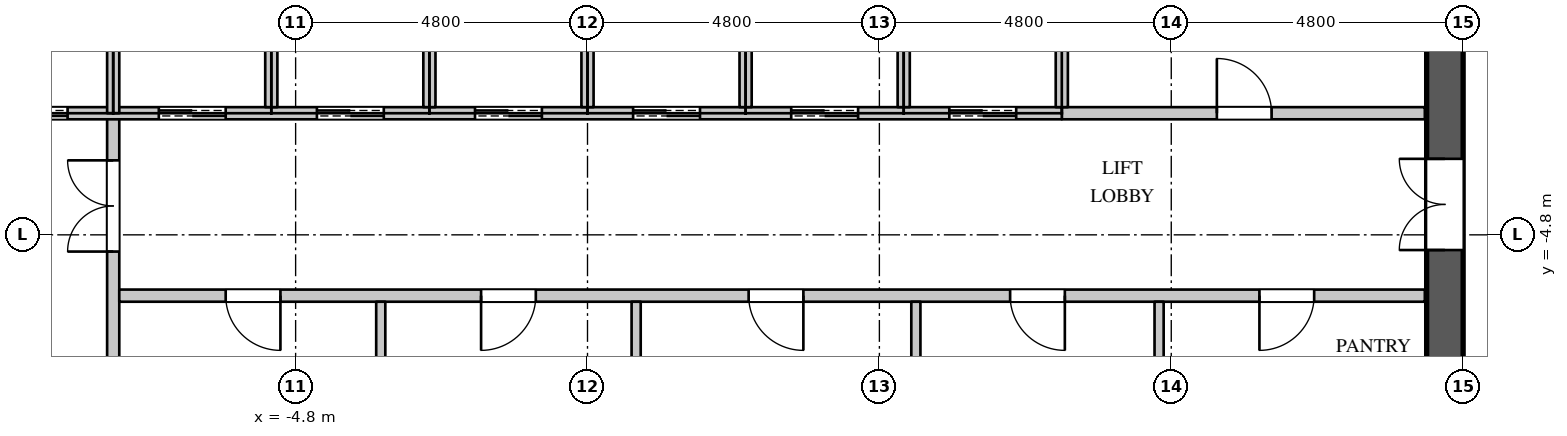
"""IFC4 building model, lengths in metres.
Left out: names, types, materials, properties, quantities, classifications, styles, units other than length and angle.
Written with IfcOpenShell. Run it as: python <this file> out.ifc"""

import sys

from ifc_helpers import new_model, si_unit, direction, frame, frame_2d, origin, place, context, subcontext, project, spatial, rectangle, extrude, element, fill, save


model = new_model("IFC4")
c1 = context("Model", 3, precision=1e-05, world=origin(), true_north=direction((0.0, 1.0)))
c2 = subcontext(c1, "Body", "Model", "MODEL_VIEW")
j1 = project(units=[si_unit("LENGTHUNIT", "METRE"), si_unit("PLANEANGLEUNIT", "RADIAN")], contexts=[c1])
p1 = place(None, origin())
s1 = spatial("IfcSite", under=j1, at=p1, CompositionType="ELEMENT")
p2 = place(p1, origin())
s2 = spatial("IfcBuilding", under=s1, at=p2, CompositionType="ELEMENT")
p3 = place(p2, frame((0.0, 0.0, 218.1)))
s3 = spatial("IfcBuildingStorey", under=s2, at=p3, CompositionType="ELEMENT", Elevation=218.1)
p4 = place(p3, frame((14.1, -11.4, 0.0), z_axis=(0.0, 0.0, 1.0), x_axis=(0.0, 1.0, 0.0)))
e1 = element("IfcWall", 1, at=p4, inside=s3, PredefinedType="SHEAR", context=c2, shape_type="SweptSolid", body=[
    extrude(rectangle(XDim=22.8, YDim=0.6, at=frame_2d((11.4, 0.0))), origin(), (0.0, 0.0, 1.0), 4.2),
])
p5 = place(p4, frame((20.45, 0.0, 0.0)))
e2 = element("IfcOpeningElement", 2, at=p5, cuts=e1, PredefinedType="OPENING", context=c2, shape_type="SweptSolid", body=[
    extrude(rectangle(XDim=1.1, YDim=2.2, at=frame_2d((0.55, 1.1))), frame((0.0, 0.31, 0.0), z_axis=(0.0, -1.0, 0.0), x_axis=(1.0, 0.0, 0.0)), (0.0, 0.0, 1.0), 0.62),
])
p6 = place(p4, frame((1.25, 0.0, 0.0)))
e3 = element("IfcOpeningElement", 3, at=p6, cuts=e1, PredefinedType="OPENING", context=c2, shape_type="SweptSolid", body=[
    extrude(rectangle(XDim=1.1, YDim=2.2, at=frame_2d((0.55, 1.1))), frame((0.0, 0.31, 0.0), z_axis=(0.0, -1.0, 0.0), x_axis=(1.0, 0.0, 0.0)), (0.0, 0.0, 1.0), 0.62),
])
p7 = place(p4, frame((14.95, 0.0, 0.0)))
e4 = element("IfcOpeningElement", 4, at=p7, cuts=e1, PredefinedType="OPENING", context=c2, shape_type="SweptSolid", body=[
    extrude(rectangle(XDim=1.5, YDim=2.4, at=frame_2d((0.75, 1.2))), frame((0.0, 0.31, 0.0), z_axis=(0.0, -1.0, 0.0), x_axis=(1.0, 0.0, 0.0)), (0.0, 0.0, 1.0), 0.62),
])
p8 = place(p4, frame((6.35, 0.0, 0.0)))
e5 = element("IfcOpeningElement", 5, at=p8, cuts=e1, PredefinedType="OPENING", context=c2, shape_type="SweptSolid", body=[
    extrude(rectangle(XDim=1.5, YDim=2.4, at=frame_2d((0.75, 1.2))), frame((0.0, 0.31, 0.0), z_axis=(0.0, -1.0, 0.0), x_axis=(1.0, 0.0, 0.0)), (0.0, 0.0, 1.0), 0.62),
])
p9 = place(p3, frame((-7.8, -8.075, 0.0), z_axis=(0.0, 0.0, 1.0), x_axis=(0.0, 1.0, 0.0)))
e6 = element("IfcWall", 6, at=p9, inside=s3, PredefinedType="PARTITIONING", context=c2, shape_type="SweptSolid", body=[
    extrude(rectangle(XDim=5.275, YDim=0.2, at=frame_2d((2.637, 0.0))), origin(), (0.0, 0.0, 1.0), 3.95),
])
p10 = place(p9, frame((3.0, 0.0, 0.0)))
e7 = element("IfcOpeningElement", 7, at=p10, cuts=e6, PredefinedType="OPENING", context=c2, shape_type="SweptSolid", body=[
    extrude(rectangle(XDim=1.5, YDim=2.4, at=frame_2d((0.75, 1.2))), frame((0.0, 0.11, 0.0), z_axis=(0.0, -1.0, 0.0), x_axis=(1.0, 0.0, 0.0)), (0.0, 0.0, 1.0), 0.22),
])
p11 = place(p3, frame((-7.7, -5.8, 0.0), z_axis=(0.0, 0.0, 1.0), x_axis=(1.0, 0.0, 0.0)))
e8 = element("IfcWall", 8, at=p11, inside=s3, PredefinedType="PARTITIONING", context=c2, shape_type="SweptSolid", body=[
    extrude(rectangle(XDim=21.47, YDim=0.2, at=frame_2d((10.735, 0.0))), origin(), (0.0, 0.0, 1.0), 3.95),
])
p12 = place(p11, frame((1.75, 0.0, 0.0)))
e9 = element("IfcOpeningElement", 9, at=p12, cuts=e8, PredefinedType="OPENING", context=c2, shape_type="SweptSolid", body=[
    extrude(rectangle(XDim=0.9, YDim=2.2, at=frame_2d((0.45, 1.1))), frame((0.0, 0.11, 0.0), z_axis=(0.0, -1.0, 0.0), x_axis=(1.0, 0.0, 0.0)), (0.0, 0.0, 1.0), 0.22),
])
p13 = place(p11, frame((5.95, 0.0, 0.0)))
e10 = element("IfcOpeningElement", 10, at=p13, cuts=e8, PredefinedType="OPENING", context=c2, shape_type="SweptSolid", body=[
    extrude(rectangle(XDim=0.9, YDim=2.2, at=frame_2d((0.45, 1.1))), frame((0.0, 0.11, 0.0), z_axis=(0.0, -1.0, 0.0), x_axis=(1.0, 0.0, 0.0)), (0.0, 0.0, 1.0), 0.22),
])
p14 = place(p11, frame((10.35, 0.0, 0.0)))
e11 = element("IfcOpeningElement", 11, at=p14, cuts=e8, PredefinedType="OPENING", context=c2, shape_type="SweptSolid", body=[
    extrude(rectangle(XDim=0.9, YDim=2.2, at=frame_2d((0.45, 1.1))), frame((0.0, 0.11, 0.0), z_axis=(0.0, -1.0, 0.0), x_axis=(1.0, 0.0, 0.0)), (0.0, 0.0, 1.0), 0.22),
])
p15 = place(p11, frame((14.65, 0.0, 0.0)))
e12 = element("IfcOpeningElement", 12, at=p15, cuts=e8, PredefinedType="OPENING", context=c2, shape_type="SweptSolid", body=[
    extrude(rectangle(XDim=0.9, YDim=2.2, at=frame_2d((0.45, 1.1))), frame((0.0, 0.11, 0.0), z_axis=(0.0, -1.0, 0.0), x_axis=(1.0, 0.0, 0.0)), (0.0, 0.0, 1.0), 0.22),
])
p16 = place(p11, frame((18.75, 0.0, 0.0)))
e13 = element("IfcOpeningElement", 13, at=p16, cuts=e8, PredefinedType="OPENING", context=c2, shape_type="SweptSolid", body=[
    extrude(rectangle(XDim=0.9, YDim=2.2, at=frame_2d((0.45, 1.1))), frame((0.0, 0.11, 0.0), z_axis=(0.0, -1.0, 0.0), x_axis=(1.0, 0.0, 0.0)), (0.0, 0.0, 1.0), 0.22),
])
for number, where, z_axis, x_axis in (
    (14, (-3.4, -11.37, 0.0), (0.0, 0.0, 1.0), (0.0, 1.0, 0.0)),
    (15, (0.8, -11.37, 0.0), (0.0, 0.0, 1.0), (0.0, 1.0, 0.0)),
):
    element("IfcWall", number, at=place(p3, frame(where, z_axis=z_axis, x_axis=x_axis)), inside=s3, PredefinedType="PARTITIONING", context=c2, shape_type="SweptSolid", body=[
        extrude(rectangle(XDim=5.47, YDim=0.15, at=frame_2d((2.735, 0.0))), origin(), (0.0, 0.0, 1.0), 3.95),
    ])
p17 = place(p3, frame((5.4, -8.2, 0.0), z_axis=(0.0, 0.0, 1.0), x_axis=(0.0, 1.0, 0.0)))
e16 = element("IfcWall", 16, at=p17, inside=s3, PredefinedType="PARTITIONING", context=c2, shape_type="SweptSolid", body=[
    extrude(rectangle(XDim=2.3, YDim=0.15, at=frame_2d((1.15, 0.0))), origin(), (0.0, 0.0, 1.0), 3.95),
])
p18 = place(p3, frame((9.4, -8.075, 0.0), z_axis=(0.0, 0.0, 1.0), x_axis=(0.0, 1.0, 0.0)))
e17 = element("IfcWall", 17, at=p18, inside=s3, PredefinedType="PARTITIONING", context=c2, shape_type="SweptSolid", body=[
    extrude(rectangle(XDim=2.175, YDim=0.15, at=frame_2d((1.087, 0.0))), origin(), (0.0, 0.0, 1.0), 3.95),
])
p19 = place(p3, frame((7.8, -2.8, 0.0), z_axis=(0.0, 0.0, 1.0), x_axis=(1.0, 0.0, 0.0)))
e18 = element("IfcWall", 18, at=p19, inside=s3, PredefinedType="PARTITIONING", context=c2, shape_type="SweptSolid", body=[
    extrude(rectangle(XDim=5.97, YDim=0.2, at=frame_2d((2.985, 0.0))), origin(), (0.0, 0.0, 1.0), 3.95),
])
p20 = place(p19, frame((2.55, 0.0, 0.0)))
e19 = element("IfcOpeningElement", 19, at=p20, cuts=e18, PredefinedType="OPENING", context=c2, shape_type="SweptSolid", body=[
    extrude(rectangle(XDim=0.9, YDim=2.2, at=frame_2d((0.45, 1.1))), frame((0.0, 0.11, 0.0), z_axis=(0.0, -1.0, 0.0), x_axis=(1.0, 0.0, 0.0)), (0.0, 0.0, 1.0), 0.22),
])
p21 = place(p3, frame((-10.4, -2.8, 0.0), z_axis=(0.0, 0.0, 1.0), x_axis=(1.0, 0.0, 0.0)))
e20 = element("IfcWall", 20, at=p21, inside=s3, PredefinedType="PARTITIONING", context=c2, shape_type="SweptSolid", body=[
    extrude(rectangle(XDim=18.2, YDim=0.2, at=frame_2d((9.1, 0.0))), origin(), (0.0, 0.0, 1.0), 3.95),
])
p22 = place(p21, frame((0.75, 0.0, 0.0)))
e21 = element("IfcOpeningElement", 21, at=p22, cuts=e20, PredefinedType="OPENING", context=c2, shape_type="SweptSolid", body=[
    extrude(rectangle(XDim=1.1, YDim=2.2, at=frame_2d((0.55, 1.1))), frame((0.0, 0.11, 0.0), z_axis=(0.0, -1.0, 0.0), x_axis=(1.0, 0.0, 0.0)), (0.0, 0.0, 1.0), 0.22),
])
p23 = place(p21, frame((3.35, 0.0, 0.0)))
e22 = element("IfcOpeningElement", 22, at=p23, cuts=e20, PredefinedType="OPENING", context=c2, shape_type="SweptSolid", body=[
    extrude(rectangle(XDim=1.1, YDim=2.2, at=frame_2d((0.55, 1.1))), frame((0.0, 0.11, 0.0), z_axis=(0.0, -1.0, 0.0), x_axis=(1.0, 0.0, 0.0)), (0.0, 0.0, 1.0), 0.22),
])
p24 = place(p21, frame((5.95, 0.0, 0.0)))
e23 = element("IfcOpeningElement", 23, at=p24, cuts=e20, PredefinedType="OPENING", context=c2, shape_type="SweptSolid", body=[
    extrude(rectangle(XDim=1.1, YDim=2.2, at=frame_2d((0.55, 1.1))), frame((0.0, 0.11, 0.0), z_axis=(0.0, -1.0, 0.0), x_axis=(1.0, 0.0, 0.0)), (0.0, 0.0, 1.0), 0.22),
])
p25 = place(p21, frame((8.55, 0.0, 0.0)))
e24 = element("IfcOpeningElement", 24, at=p25, cuts=e20, PredefinedType="OPENING", context=c2, shape_type="SweptSolid", body=[
    extrude(rectangle(XDim=1.1, YDim=2.2, at=frame_2d((0.55, 1.1))), frame((0.0, 0.11, 0.0), z_axis=(0.0, -1.0, 0.0), x_axis=(1.0, 0.0, 0.0)), (0.0, 0.0, 1.0), 0.22),
])
p26 = place(p21, frame((11.15, 0.0, 0.0)))
e25 = element("IfcOpeningElement", 25, at=p26, cuts=e20, PredefinedType="OPENING", context=c2, shape_type="SweptSolid", body=[
    extrude(rectangle(XDim=1.1, YDim=2.2, at=frame_2d((0.55, 1.1))), frame((0.0, 0.11, 0.0), z_axis=(0.0, -1.0, 0.0), x_axis=(1.0, 0.0, 0.0)), (0.0, 0.0, 1.0), 0.22),
])
p27 = place(p21, frame((13.75, 0.0, 0.0)))
e26 = element("IfcOpeningElement", 26, at=p27, cuts=e20, PredefinedType="OPENING", context=c2, shape_type="SweptSolid", body=[
    extrude(rectangle(XDim=1.1, YDim=2.2, at=frame_2d((0.55, 1.1))), frame((0.0, 0.11, 0.0), z_axis=(0.0, -1.0, 0.0), x_axis=(1.0, 0.0, 0.0)), (0.0, 0.0, 1.0), 0.22),
])
p28 = place(p21, frame((16.35, 0.0, 0.0)))
e27 = element("IfcOpeningElement", 27, at=p28, cuts=e20, PredefinedType="OPENING", context=c2, shape_type="SweptSolid", body=[
    extrude(rectangle(XDim=1.1, YDim=2.2, at=frame_2d((0.55, 1.1))), frame((0.0, 0.11, 0.0), z_axis=(0.0, -1.0, 0.0), x_axis=(1.0, 0.0, 0.0)), (0.0, 0.0, 1.0), 0.22),
])
p29 = place(p3, frame((-7.8, -2.8, 0.0), z_axis=(0.0, 0.0, 1.0), x_axis=(0.0, 1.0, 0.0)))
e28 = element("IfcWall", 28, at=p29, inside=s3, PredefinedType="PARTITIONING", context=c2, shape_type="SweptSolid", body=[
    extrude(rectangle(XDim=2.8, YDim=0.2, at=frame_2d((1.4, 0.0))), origin(), (0.0, 0.0, 1.0), 3.95),
])
for number, where, z_axis, x_axis in (
    (29, (-5.2, -2.7, 0.0), (0.0, 0.0, 1.0), (0.0, 1.0, 0.0)),
    (30, (-2.6, -2.7, 0.0), (0.0, 0.0, 1.0), (0.0, 1.0, 0.0)),
    (31, (0.0, -2.7, 0.0), (0.0, 0.0, 1.0), (0.0, 1.0, 0.0)),
    (32, (2.6, -2.7, 0.0), (0.0, 0.0, 1.0), (0.0, 1.0, 0.0)),
    (33, (5.2, -2.7, 0.0), (0.0, 0.0, 1.0), (0.0, 1.0, 0.0)),
    (34, (7.8, -2.7, 0.0), (0.0, 0.0, 1.0), (0.0, 1.0, 0.0)),
):
    element("IfcWall", number, at=place(p3, frame(where, z_axis=z_axis, x_axis=x_axis)), inside=s3, PredefinedType="PARTITIONING", context=c2, shape_type="SweptSolid", body=[
        extrude(rectangle(XDim=2.6, YDim=0.2, at=frame_2d((1.3, 0.0))), origin(), (0.0, 0.0, 1.0), 3.95),
    ])
p30 = place(p20, origin())
e35 = element("IfcDoor", 35, at=p30, inside=s3, OperationType="SINGLE_SWING_LEFT", PredefinedType="DOOR", context=c2, shape_type="SweptSolid", body=[
    extrude(rectangle(XDim=0.9, YDim=2.2, at=frame_2d((0.45, 1.1))), frame((0.0, 0.025, 0.0), z_axis=(0.0, -1.0, 0.0), x_axis=(1.0, 0.0, 0.0)), (0.0, 0.0, 1.0), 0.05),
])
fill(e19, e35)
p31 = place(p12, origin())
e36 = element("IfcDoor", 36, at=p31, inside=s3, OperationType="SINGLE_SWING_LEFT", PredefinedType="DOOR", context=c2, shape_type="SweptSolid", body=[
    extrude(rectangle(XDim=0.9, YDim=2.2, at=frame_2d((0.45, 1.1))), frame((0.0, 0.025, 0.0), z_axis=(0.0, -1.0, 0.0), x_axis=(1.0, 0.0, 0.0)), (0.0, 0.0, 1.0), 0.05),
])
fill(e9, e36)
p32 = place(p13, origin())
e37 = element("IfcDoor", 37, at=p32, inside=s3, OperationType="SINGLE_SWING_RIGHT", PredefinedType="DOOR", context=c2, shape_type="SweptSolid", body=[
    extrude(rectangle(XDim=0.9, YDim=2.2, at=frame_2d((0.45, 1.1))), frame((0.0, 0.025, 0.0), z_axis=(0.0, -1.0, 0.0), x_axis=(1.0, 0.0, 0.0)), (0.0, 0.0, 1.0), 0.05),
])
fill(e10, e37)
p33 = place(p14, origin())
e38 = element("IfcDoor", 38, at=p33, inside=s3, OperationType="SINGLE_SWING_LEFT", PredefinedType="DOOR", context=c2, shape_type="SweptSolid", body=[
    extrude(rectangle(XDim=0.9, YDim=2.2, at=frame_2d((0.45, 1.1))), frame((0.0, 0.025, 0.0), z_axis=(0.0, -1.0, 0.0), x_axis=(1.0, 0.0, 0.0)), (0.0, 0.0, 1.0), 0.05),
])
fill(e11, e38)
p34 = place(p15, origin())
e39 = element("IfcDoor", 39, at=p34, inside=s3, OperationType="SINGLE_SWING_LEFT", PredefinedType="DOOR", context=c2, shape_type="SweptSolid", body=[
    extrude(rectangle(XDim=0.9, YDim=2.2, at=frame_2d((0.45, 1.1))), frame((0.0, 0.025, 0.0), z_axis=(0.0, -1.0, 0.0), x_axis=(1.0, 0.0, 0.0)), (0.0, 0.0, 1.0), 0.05),
])
fill(e12, e39)
p35 = place(p16, origin())
e40 = element("IfcDoor", 40, at=p35, inside=s3, OperationType="SINGLE_SWING_RIGHT", PredefinedType="DOOR", context=c2, shape_type="SweptSolid", body=[
    extrude(rectangle(XDim=0.9, YDim=2.2, at=frame_2d((0.45, 1.1))), frame((0.0, 0.025, 0.0), z_axis=(0.0, -1.0, 0.0), x_axis=(1.0, 0.0, 0.0)), (0.0, 0.0, 1.0), 0.05),
])
fill(e13, e40)
p36 = place(p22, origin())
e41 = element("IfcDoor", 41, at=p36, inside=s3, OperationType="DOUBLE_DOOR_SLIDING", PredefinedType="DOOR", context=c2, shape_type="SweptSolid", body=[
    extrude(rectangle(XDim=1.1, YDim=2.2, at=frame_2d((0.55, 1.1))), frame((0.0, 0.025, 0.0), z_axis=(0.0, -1.0, 0.0), x_axis=(1.0, 0.0, 0.0)), (0.0, 0.0, 1.0), 0.05),
])
fill(e21, e41)
p37 = place(p23, origin())
e42 = element("IfcDoor", 42, at=p37, inside=s3, OperationType="DOUBLE_DOOR_SLIDING", PredefinedType="DOOR", context=c2, shape_type="SweptSolid", body=[
    extrude(rectangle(XDim=1.1, YDim=2.2, at=frame_2d((0.55, 1.1))), frame((0.0, 0.025, 0.0), z_axis=(0.0, -1.0, 0.0), x_axis=(1.0, 0.0, 0.0)), (0.0, 0.0, 1.0), 0.05),
])
fill(e22, e42)
p38 = place(p24, origin())
e43 = element("IfcDoor", 43, at=p38, inside=s3, OperationType="DOUBLE_DOOR_SLIDING", PredefinedType="DOOR", context=c2, shape_type="SweptSolid", body=[
    extrude(rectangle(XDim=1.1, YDim=2.2, at=frame_2d((0.55, 1.1))), frame((0.0, 0.025, 0.0), z_axis=(0.0, -1.0, 0.0), x_axis=(1.0, 0.0, 0.0)), (0.0, 0.0, 1.0), 0.05),
])
fill(e23, e43)
p39 = place(p25, origin())
e44 = element("IfcDoor", 44, at=p39, inside=s3, OperationType="DOUBLE_DOOR_SLIDING", PredefinedType="DOOR", context=c2, shape_type="SweptSolid", body=[
    extrude(rectangle(XDim=1.1, YDim=2.2, at=frame_2d((0.55, 1.1))), frame((0.0, 0.025, 0.0), z_axis=(0.0, -1.0, 0.0), x_axis=(1.0, 0.0, 0.0)), (0.0, 0.0, 1.0), 0.05),
])
fill(e24, e44)
p40 = place(p26, origin())
e45 = element("IfcDoor", 45, at=p40, inside=s3, OperationType="DOUBLE_DOOR_SLIDING", PredefinedType="DOOR", context=c2, shape_type="SweptSolid", body=[
    extrude(rectangle(XDim=1.1, YDim=2.2, at=frame_2d((0.55, 1.1))), frame((0.0, 0.025, 0.0), z_axis=(0.0, -1.0, 0.0), x_axis=(1.0, 0.0, 0.0)), (0.0, 0.0, 1.0), 0.05),
])
fill(e25, e45)
p41 = place(p27, origin())
e46 = element("IfcDoor", 46, at=p41, inside=s3, OperationType="DOUBLE_DOOR_SLIDING", PredefinedType="DOOR", context=c2, shape_type="SweptSolid", body=[
    extrude(rectangle(XDim=1.1, YDim=2.2, at=frame_2d((0.55, 1.1))), frame((0.0, 0.025, 0.0), z_axis=(0.0, -1.0, 0.0), x_axis=(1.0, 0.0, 0.0)), (0.0, 0.0, 1.0), 0.05),
])
fill(e26, e46)
p42 = place(p28, origin())
e47 = element("IfcDoor", 47, at=p42, inside=s3, OperationType="DOUBLE_DOOR_SLIDING", PredefinedType="DOOR", context=c2, shape_type="SweptSolid", body=[
    extrude(rectangle(XDim=1.1, YDim=2.2, at=frame_2d((0.55, 1.1))), frame((0.0, 0.025, 0.0), z_axis=(0.0, -1.0, 0.0), x_axis=(1.0, 0.0, 0.0)), (0.0, 0.0, 1.0), 0.05),
])
fill(e27, e47)
p43 = place(p10, origin())
e48 = element("IfcDoor", 48, at=p43, inside=s3, OperationType="DOUBLE_DOOR_SINGLE_SWING", PredefinedType="DOOR", context=c2, shape_type="SweptSolid", body=[
    extrude(rectangle(XDim=1.5, YDim=2.4, at=frame_2d((0.75, 1.2))), frame((0.0, 0.025, 0.0), z_axis=(0.0, -1.0, 0.0), x_axis=(1.0, 0.0, 0.0)), (0.0, 0.0, 1.0), 0.05),
])
fill(e7, e48)
p44 = place(p8, origin())
e49 = element("IfcDoor", 49, at=p44, inside=s3, OperationType="DOUBLE_DOOR_SINGLE_SWING", PredefinedType="DOOR", context=c2, shape_type="SweptSolid", body=[
    extrude(rectangle(XDim=1.5, YDim=2.4, at=frame_2d((0.75, 1.2))), frame((0.0, 0.295, 0.0), z_axis=(0.0, -1.0, 0.0), x_axis=(1.0, 0.0, 0.0)), (0.0, 0.0, 1.0), 0.05),
])
fill(e5, e49)
save(model, sys.argv[1])
